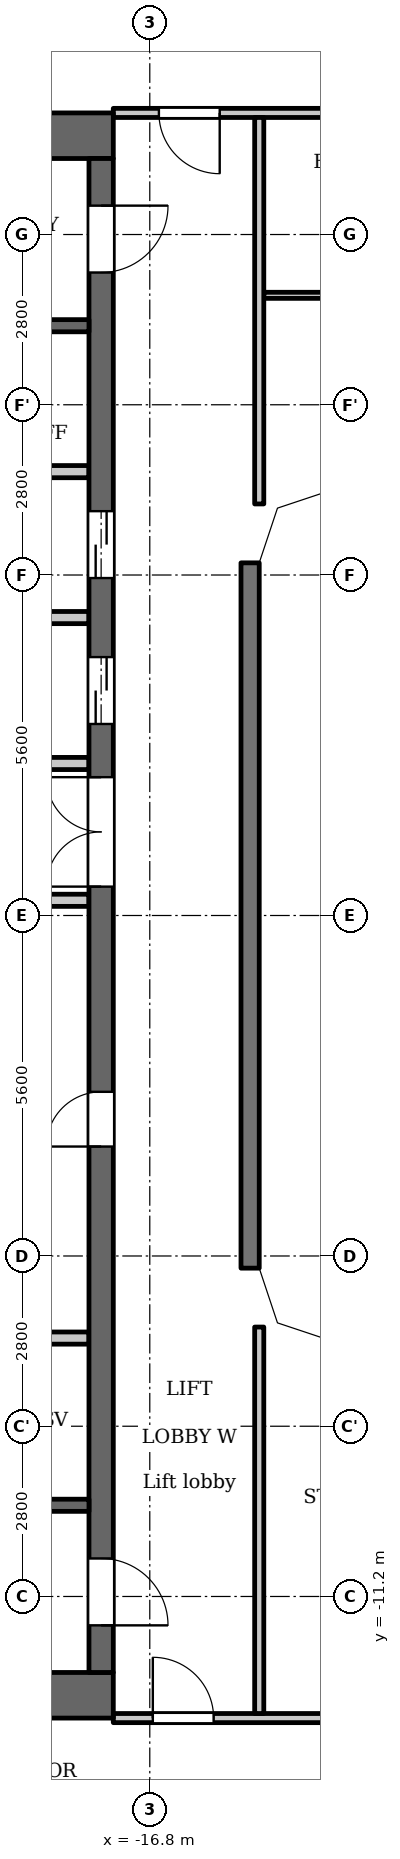
"""IFC4 building model, lengths in metres.
Left out: names, types, materials, properties, quantities, classifications, styles, units other than length and angle.
Written with IfcOpenShell. Run it as: python <this file> out.ifc"""

import sys

from ifc_helpers import new_model, si_unit, direction, frame, frame_2d, origin, place, context, subcontext, project, spatial, polyline, rectangle, outline, extrude, element, fill, save


model = new_model("IFC4")
c1 = context("Model", 3, precision=1e-05, world=origin(), true_north=direction((0.0, 1.0)))
c2 = subcontext(c1, "Body", "Model", "MODEL_VIEW")
j1 = project(units=[si_unit("LENGTHUNIT", "METRE"), si_unit("PLANEANGLEUNIT", "RADIAN")], contexts=[c1])
p1 = place(None, origin())
s1 = spatial("IfcSite", under=j1, at=p1, CompositionType="ELEMENT")
p2 = place(p1, origin())
s2 = spatial("IfcBuilding", under=s1, at=p2, CompositionType="ELEMENT")
p3 = place(p2, frame((0.0, 0.0, 213.4)))
s3 = spatial("IfcBuildingStorey", under=s2, at=p3, CompositionType="ELEMENT", Elevation=213.4)
p4 = place(p3, frame((-15.15, -5.8, 0.0), z_axis=(0.0, 0.0, 1.0), x_axis=(0.0, 1.0, 0.0)))
e1 = element("IfcWall", 1, at=p4, inside=s3, PredefinedType="SOLIDWALL", context=c2, shape_type="SweptSolid", body=[
    extrude(rectangle(XDim=11.6, YDim=0.3, at=frame_2d((5.8, 0.0))), origin(), (0.0, 0.0, 1.0), 3.2),
])
for number, where, z_axis, x_axis in (
    (2, (-17.4, 12.825, 0.0), (0.0, 0.0, 1.0), (-1.0, 0.0, 0.0)),
    (3, (-17.4, -12.825, 0.0), (0.0, 0.0, 1.0), (-1.0, 0.0, 0.0)),
):
    element("IfcWall", number, at=place(p3, frame(where, z_axis=z_axis, x_axis=x_axis)), inside=s3, PredefinedType="SHEAR", context=c2, shape_type="SweptSolid", body=[
        extrude(rectangle(XDim=7.6, YDim=0.75, at=frame_2d((3.8, 0.0))), origin(), (0.0, 0.0, 1.0), 3.2),
    ])
p5 = place(p3, frame((-17.6, -12.45, 0.0), z_axis=(0.0, 0.0, 1.0), x_axis=(0.0, 1.0, 0.0)))
e4 = element("IfcWall", 4, at=p5, inside=s3, PredefinedType="SHEAR", context=c2, shape_type="SweptSolid", body=[
    extrude(rectangle(XDim=24.9, YDim=0.4, at=frame_2d((12.45, 0.0))), origin(), (0.0, 0.0, 1.0), 3.2),
])
p6 = place(p5, frame((8.65, 0.0, 0.0)))
e5 = element("IfcOpeningElement", 5, at=p6, cuts=e4, PredefinedType="OPENING", context=c2, shape_type="SweptSolid", body=[
    extrude(rectangle(XDim=0.9, YDim=2.1, at=frame_2d((0.45, 1.05))), frame((0.0, 0.21, 0.0), z_axis=(0.0, -1.0, 0.0), x_axis=(1.0, 0.0, 0.0)), (0.0, 0.0, 1.0), 0.42),
])
p7 = place(p5, frame((15.6, 0.0, 0.0)))
e6 = element("IfcOpeningElement", 6, at=p7, cuts=e4, PredefinedType="OPENING", context=c2, shape_type="SweptSolid", body=[
    extrude(rectangle(XDim=1.1, YDim=2.1, at=frame_2d((0.55, 1.05))), frame((0.0, 0.21, 0.0), z_axis=(0.0, -1.0, 0.0), x_axis=(1.0, 0.0, 0.0)), (0.0, 0.0, 1.0), 0.42),
])
p8 = place(p5, frame((18.0, 0.0, 0.0)))
e7 = element("IfcOpeningElement", 7, at=p8, cuts=e4, PredefinedType="OPENING", context=c2, shape_type="SweptSolid", body=[
    extrude(rectangle(XDim=1.1, YDim=2.1, at=frame_2d((0.55, 1.05))), frame((0.0, 0.21, 0.0), z_axis=(0.0, -1.0, 0.0), x_axis=(1.0, 0.0, 0.0)), (0.0, 0.0, 1.0), 0.42),
])
p9 = place(p5, frame((23.025, 0.0, 0.0)))
e8 = element("IfcOpeningElement", 8, at=p9, cuts=e4, PredefinedType="OPENING", context=c2, shape_type="SweptSolid", body=[
    extrude(rectangle(XDim=1.1, YDim=2.1, at=frame_2d((0.55, 1.05))), frame((0.0, 0.21, 0.0), z_axis=(0.0, -1.0, 0.0), x_axis=(1.0, 0.0, 0.0)), (0.0, 0.0, 1.0), 0.42),
])
p10 = place(p5, frame((0.775, 0.0, 0.0)))
e9 = element("IfcOpeningElement", 9, at=p10, cuts=e4, PredefinedType="OPENING", context=c2, shape_type="SweptSolid", body=[
    extrude(rectangle(XDim=1.1, YDim=2.1, at=frame_2d((0.55, 1.05))), frame((0.0, 0.21, 0.0), z_axis=(0.0, -1.0, 0.0), x_axis=(1.0, 0.0, 0.0)), (0.0, 0.0, 1.0), 0.42),
])
p11 = place(p5, frame((12.925, 0.0, 0.0)))
e10 = element("IfcOpeningElement", 10, at=p11, cuts=e4, PredefinedType="OPENING", context=c2, shape_type="SweptSolid", body=[
    extrude(rectangle(XDim=1.8, YDim=2.1, at=frame_2d((0.9, 1.05))), frame((0.0, 0.21, 0.0), z_axis=(0.0, -1.0, 0.0), x_axis=(1.0, 0.0, 0.0)), (0.0, 0.0, 1.0), 0.42),
])
p12 = place(p3, frame((-17.8, -9.7, 0.0), z_axis=(0.0, 0.0, 1.0), x_axis=(-1.0, 0.0, 0.0)))
e11 = element("IfcWall", 11, at=p12, inside=s3, PredefinedType="SHEAR", context=c2, shape_type="SweptSolid", body=[
    extrude(rectangle(XDim=5.65, YDim=0.2, at=frame_2d((2.825, 0.0))), origin(), (0.0, 0.0, 1.0), 3.2),
])
p13 = place(p12, frame((0.85, 0.0, 0.0)))
e12 = element("IfcOpeningElement", 12, at=p13, cuts=e11, PredefinedType="OPENING", context=c2, shape_type="SweptSolid", body=[
    extrude(rectangle(XDim=1.1, YDim=2.1, at=frame_2d((0.55, 1.05))), frame((0.0, 0.11, 0.0), z_axis=(0.0, -1.0, 0.0), x_axis=(1.0, 0.0, 0.0)), (0.0, 0.0, 1.0), 0.22),
])
p14 = place(p12, frame((3.75, 0.0, 0.0)))
e13 = element("IfcOpeningElement", 13, at=p14, cuts=e11, PredefinedType="OPENING", context=c2, shape_type="SweptSolid", body=[
    extrude(rectangle(XDim=1.1, YDim=2.1, at=frame_2d((0.55, 1.05))), frame((0.0, 0.11, 0.0), z_axis=(0.0, -1.0, 0.0), x_axis=(1.0, 0.0, 0.0)), (0.0, 0.0, 1.0), 0.22),
])
p15 = place(p3, frame((-17.8, -6.95, 0.0), z_axis=(0.0, 0.0, 1.0), x_axis=(-1.0, 0.0, 0.0)))
e14 = element("IfcWall", 14, at=p15, inside=s3, PredefinedType="PARTITIONING", context=c2, shape_type="SweptSolid", body=[
    extrude(rectangle(XDim=2.8, YDim=0.2, at=frame_2d((1.4, 0.0))), origin(), (0.0, 0.0, 1.0), 3.2),
])
p16 = place(p3, frame((-17.8, 0.25, 0.0), z_axis=(0.0, 0.0, 1.0), x_axis=(-1.0, 0.0, 0.0)))
e15 = element("IfcWall", 15, at=p16, inside=s3, PredefinedType="PARTITIONING", context=c2, shape_type="SweptSolid", body=[
    extrude(rectangle(XDim=3.0, YDim=0.2, at=frame_2d((1.5, 0.0))), origin(), (0.0, 0.0, 1.0), 3.2),
])
p17 = place(p16, frame((1.98, 0.0, 0.0)))
e16 = element("IfcOpeningElement", 16, at=p17, cuts=e15, PredefinedType="OPENING", context=c2, shape_type="SweptSolid", body=[
    extrude(rectangle(XDim=0.9, YDim=2.1, at=frame_2d((0.45, 1.05))), frame((0.0, 0.11, 0.0), z_axis=(0.0, -1.0, 0.0), x_axis=(1.0, 0.0, 0.0)), (0.0, 0.0, 1.0), 0.22),
])
p18 = place(p3, frame((-17.8, 2.5, 0.0), z_axis=(0.0, 0.0, 1.0), x_axis=(-1.0, 0.0, 0.0)))
e17 = element("IfcWall", 17, at=p18, inside=s3, PredefinedType="PARTITIONING", context=c2, shape_type="SweptSolid", body=[
    extrude(rectangle(XDim=3.0, YDim=0.2, at=frame_2d((1.5, 0.0))), origin(), (0.0, 0.0, 1.0), 3.2),
])
for number, where, z_axis, x_axis in (
    (18, (-17.8, 4.9, 0.0), (0.0, 0.0, 1.0), (-1.0, 0.0, 0.0)),
    (19, (-17.8, 7.3, 0.0), (0.0, 0.0, 1.0), (-1.0, 0.0, 0.0)),
):
    element("IfcWall", number, at=place(p3, frame(where, z_axis=z_axis, x_axis=x_axis)), inside=s3, PredefinedType="PARTITIONING", context=c2, shape_type="SweptSolid", body=[
        extrude(rectangle(XDim=2.8, YDim=0.2, at=frame_2d((1.4, 0.0))), origin(), (0.0, 0.0, 1.0), 3.2),
    ])
p19 = place(p3, frame((-17.8, 9.7, 0.0), z_axis=(0.0, 0.0, 1.0), x_axis=(-1.0, 0.0, 0.0)))
e20 = element("IfcWall", 20, at=p19, inside=s3, PredefinedType="SHEAR", context=c2, shape_type="SweptSolid", body=[
    extrude(rectangle(XDim=5.65, YDim=0.2, at=frame_2d((2.825, 0.0))), origin(), (0.0, 0.0, 1.0), 3.2),
])
p20 = place(p19, frame((0.85, 0.0, 0.0)))
e21 = element("IfcOpeningElement", 21, at=p20, cuts=e20, PredefinedType="OPENING", context=c2, shape_type="SweptSolid", body=[
    extrude(rectangle(XDim=1.1, YDim=2.1, at=frame_2d((0.55, 1.05))), frame((0.0, 0.11, 0.0), z_axis=(0.0, -1.0, 0.0), x_axis=(1.0, 0.0, 0.0)), (0.0, 0.0, 1.0), 0.22),
])
p21 = place(p19, frame((3.75, 0.0, 0.0)))
e22 = element("IfcOpeningElement", 22, at=p21, cuts=e20, PredefinedType="OPENING", context=c2, shape_type="SweptSolid", body=[
    extrude(rectangle(XDim=1.1, YDim=2.1, at=frame_2d((0.55, 1.05))), frame((0.0, 0.11, 0.0), z_axis=(0.0, -1.0, 0.0), x_axis=(1.0, 0.0, 0.0)), (0.0, 0.0, 1.0), 0.22),
])
p22 = place(p3, frame((-17.4, -13.2, 0.0), z_axis=(0.0, 0.0, 1.0), x_axis=(1.0, 0.0, 0.0)))
e23 = element("IfcWall", 23, at=p22, inside=s3, PredefinedType="PARTITIONING", context=c2, shape_type="SweptSolid", body=[
    extrude(rectangle(XDim=34.8, YDim=0.15, at=frame_2d((17.4, 0.0))), origin(), (0.0, 0.0, 1.0), 3.2),
])
p23 = place(p22, frame((0.65, 0.0, 0.0)))
e24 = element("IfcOpeningElement", 24, at=p23, cuts=e23, PredefinedType="OPENING", context=c2, shape_type="SweptSolid", body=[
    extrude(rectangle(XDim=1.0, YDim=2.1, at=frame_2d((0.5, 1.05))), frame((0.0, 0.085, 0.0), z_axis=(0.0, -1.0, 0.0), x_axis=(1.0, 0.0, 0.0)), (0.0, 0.0, 1.0), 0.17),
])
p24 = place(p22, frame((33.05, 0.0, 0.0)))
e25 = element("IfcOpeningElement", 25, at=p24, cuts=e23, PredefinedType="OPENING", context=c2, shape_type="SweptSolid", body=[
    extrude(rectangle(XDim=1.0, YDim=2.1, at=frame_2d((0.5, 1.05))), frame((0.0, 0.085, 0.0), z_axis=(0.0, -1.0, 0.0), x_axis=(1.0, 0.0, 0.0)), (0.0, 0.0, 1.0), 0.17),
])
p25 = place(p22, frame((4.55, 0.0, 0.0)))
e26 = element("IfcOpeningElement", 26, at=p25, cuts=e23, PredefinedType="OPENING", context=c2, shape_type="SweptSolid", body=[
    extrude(rectangle(XDim=1.0, YDim=2.1, at=frame_2d((0.5, 1.05))), frame((0.0, 0.085, 0.0), z_axis=(0.0, -1.0, 0.0), x_axis=(1.0, 0.0, 0.0)), (0.0, 0.0, 1.0), 0.17),
])
p26 = place(p22, frame((6.9, 0.0, 0.0)))
e27 = element("IfcOpeningElement", 27, at=p26, cuts=e23, PredefinedType="OPENING", context=c2, shape_type="SweptSolid", body=[
    extrude(rectangle(XDim=1.0, YDim=2.1, at=frame_2d((0.5, 1.05))), frame((0.0, 0.085, 0.0), z_axis=(0.0, -1.0, 0.0), x_axis=(1.0, 0.0, 0.0)), (0.0, 0.0, 1.0), 0.17),
])
p27 = place(p22, frame((15.75, 0.0, 0.0)))
e28 = element("IfcOpeningElement", 28, at=p27, cuts=e23, PredefinedType="OPENING", context=c2, shape_type="SweptSolid", body=[
    extrude(rectangle(XDim=1.0, YDim=2.1, at=frame_2d((0.5, 1.05))), frame((0.0, 0.085, 0.0), z_axis=(0.0, -1.0, 0.0), x_axis=(1.0, 0.0, 0.0)), (0.0, 0.0, 1.0), 0.17),
])
p28 = place(p22, frame((18.1, 0.0, 0.0)))
e29 = element("IfcOpeningElement", 29, at=p28, cuts=e23, PredefinedType="OPENING", context=c2, shape_type="SweptSolid", body=[
    extrude(rectangle(XDim=1.0, YDim=2.1, at=frame_2d((0.5, 1.05))), frame((0.0, 0.085, 0.0), z_axis=(0.0, -1.0, 0.0), x_axis=(1.0, 0.0, 0.0)), (0.0, 0.0, 1.0), 0.17),
])
p29 = place(p22, frame((26.95, 0.0, 0.0)))
e30 = element("IfcOpeningElement", 30, at=p29, cuts=e23, PredefinedType="OPENING", context=c2, shape_type="SweptSolid", body=[
    extrude(rectangle(XDim=1.0, YDim=2.1, at=frame_2d((0.5, 1.05))), frame((0.0, 0.085, 0.0), z_axis=(0.0, -1.0, 0.0), x_axis=(1.0, 0.0, 0.0)), (0.0, 0.0, 1.0), 0.17),
])
p30 = place(p22, frame((29.25, 0.0, 0.0)))
e31 = element("IfcOpeningElement", 31, at=p30, cuts=e23, PredefinedType="OPENING", context=c2, shape_type="SweptSolid", body=[
    extrude(rectangle(XDim=1.0, YDim=2.1, at=frame_2d((0.5, 1.05))), frame((0.0, 0.085, 0.0), z_axis=(0.0, -1.0, 0.0), x_axis=(1.0, 0.0, 0.0)), (0.0, 0.0, 1.0), 0.17),
])
p31 = place(p3, frame((-14.925, 10.2, 0.0), z_axis=(0.0, 0.0, 1.0), x_axis=(1.0, 0.0, 0.0)))
e32 = element("IfcWall", 32, at=p31, inside=s3, PredefinedType="PARTITIONING", context=c2, shape_type="SweptSolid", body=[
    extrude(rectangle(XDim=29.85, YDim=0.1, at=frame_2d((14.925, 0.0))), origin(), (0.0, 0.0, 1.0), 3.2),
])
p32 = place(p31, frame((13.475, 0.0, 0.0)))
e33 = element("IfcOpeningElement", 33, at=p32, cuts=e32, PredefinedType="OPENING", context=c2, shape_type="SweptSolid", body=[
    extrude(rectangle(XDim=0.9, YDim=2.1, at=frame_2d((0.45, 1.05))), frame((0.0, 0.06, 0.0), z_axis=(0.0, -1.0, 0.0), x_axis=(1.0, 0.0, 0.0)), (0.0, 0.0, 1.0), 0.12),
])
p33 = place(p31, frame((4.375, 0.0, 0.0)))
e34 = element("IfcOpeningElement", 34, at=p33, cuts=e32, PredefinedType="OPENING", context=c2, shape_type="SweptSolid", body=[
    extrude(rectangle(XDim=0.9, YDim=2.1, at=frame_2d((0.45, 1.05))), frame((0.0, 0.06, 0.0), z_axis=(0.0, -1.0, 0.0), x_axis=(1.0, 0.0, 0.0)), (0.0, 0.0, 1.0), 0.12),
])
p34 = place(p31, frame((19.075, 0.0, 0.0)))
e35 = element("IfcOpeningElement", 35, at=p34, cuts=e32, PredefinedType="OPENING", context=c2, shape_type="SweptSolid", body=[
    extrude(rectangle(XDim=0.9, YDim=2.1, at=frame_2d((0.45, 1.05))), frame((0.0, 0.06, 0.0), z_axis=(0.0, -1.0, 0.0), x_axis=(1.0, 0.0, 0.0)), (0.0, 0.0, 1.0), 0.12),
])
p35 = place(p31, frame((21.175, 0.0, 0.0)))
e36 = element("IfcOpeningElement", 36, at=p35, cuts=e32, PredefinedType="OPENING", context=c2, shape_type="SweptSolid", body=[
    extrude(rectangle(XDim=0.9, YDim=2.1, at=frame_2d((0.45, 1.05))), frame((0.0, 0.06, 0.0), z_axis=(0.0, -1.0, 0.0), x_axis=(1.0, 0.0, 0.0)), (0.0, 0.0, 1.0), 0.12),
])
p36 = place(p3, frame((-17.4, 13.2, 0.0), z_axis=(0.0, 0.0, 1.0), x_axis=(1.0, 0.0, 0.0)))
e37 = element("IfcWall", 37, at=p36, inside=s3, PredefinedType="PARTITIONING", context=c2, shape_type="SweptSolid", body=[
    extrude(rectangle(XDim=34.8, YDim=0.15, at=frame_2d((17.4, 0.0))), origin(), (0.0, 0.0, 1.0), 3.2),
])
p37 = place(p36, frame((0.75, 0.0, 0.0)))
e38 = element("IfcOpeningElement", 38, at=p37, cuts=e37, PredefinedType="OPENING", context=c2, shape_type="SweptSolid", body=[
    extrude(rectangle(XDim=1.0, YDim=2.1, at=frame_2d((0.5, 1.05))), frame((0.0, 0.085, 0.0), z_axis=(0.0, -1.0, 0.0), x_axis=(1.0, 0.0, 0.0)), (0.0, 0.0, 1.0), 0.17),
])
p38 = place(p36, frame((33.15, 0.0, 0.0)))
e39 = element("IfcOpeningElement", 39, at=p38, cuts=e37, PredefinedType="OPENING", context=c2, shape_type="SweptSolid", body=[
    extrude(rectangle(XDim=1.0, YDim=2.1, at=frame_2d((0.5, 1.05))), frame((0.0, 0.085, 0.0), z_axis=(0.0, -1.0, 0.0), x_axis=(1.0, 0.0, 0.0)), (0.0, 0.0, 1.0), 0.17),
])
p39 = place(p36, frame((12.45, 0.0, 0.0)))
e40 = element("IfcOpeningElement", 40, at=p39, cuts=e37, PredefinedType="OPENING", context=c2, shape_type="SweptSolid", body=[
    extrude(rectangle(XDim=1.0, YDim=2.1, at=frame_2d((0.5, 1.05))), frame((0.0, 0.085, 0.0), z_axis=(0.0, -1.0, 0.0), x_axis=(1.0, 0.0, 0.0)), (0.0, 0.0, 1.0), 0.17),
])
p40 = place(p36, frame((18.05, 0.0, 0.0)))
e41 = element("IfcOpeningElement", 41, at=p40, cuts=e37, PredefinedType="OPENING", context=c2, shape_type="SweptSolid", body=[
    extrude(rectangle(XDim=1.0, YDim=2.1, at=frame_2d((0.5, 1.05))), frame((0.0, 0.085, 0.0), z_axis=(0.0, -1.0, 0.0), x_axis=(1.0, 0.0, 0.0)), (0.0, 0.0, 1.0), 0.17),
])
for number, where, z_axis, x_axis in (
    (42, (-15.0, -13.125, 0.0), (0.0, 0.0, 1.0), (0.0, 1.0, 0.0)),
    (43, (-15.0, 6.769, 0.0), (0.0, 0.0, 1.0), (0.0, 1.0, 0.0)),
):
    element("IfcWall", number, at=place(p3, frame(where, z_axis=z_axis, x_axis=x_axis)), inside=s3, PredefinedType="PARTITIONING", context=c2, shape_type="SweptSolid", body=[
        extrude(rectangle(XDim=6.356, YDim=0.15, at=frame_2d((3.178, 0.0))), origin(), (0.0, 0.0, 1.0), 3.2),
    ])
p41 = place(p3, origin())
e44 = element("IfcWall", 44, at=p41, inside=s3, PredefinedType="SOLIDWALL", context=c2, shape_type="SweptSolid", body=[
    extrude(outline(polyline([(-13.849, 7.3), (-14.937, 6.937), (-15.3, 5.849), (-15.3, 5.8), (-15.0, 5.8), (-14.7, 6.7), (-13.8, 7.0), (-13.8, 7.3), (-13.849, 7.3)])), origin(), (0.0, 0.0, 1.0), 3.2),
])
e45 = element("IfcWall", 45, at=p41, inside=s3, PredefinedType="SOLIDWALL", context=c2, shape_type="SweptSolid", body=[
    extrude(outline(polyline([(-14.937, -6.937), (-13.849, -7.3), (-13.8, -7.3), (-13.8, -7.0), (-14.7, -6.7), (-15.0, -5.8), (-15.3, -5.8), (-15.3, -5.849), (-14.937, -6.937)])), origin(), (0.0, 0.0, 1.0), 3.2),
])
p42 = place(p6, origin())
e46 = element("IfcDoor", 46, at=p42, inside=s3, OperationType="SINGLE_SWING_RIGHT", PredefinedType="DOOR", context=c2, shape_type="SweptSolid", body=[
    extrude(rectangle(XDim=0.9, YDim=2.1, at=frame_2d((0.45, 1.05))), frame((0.0, 0.025, 0.0), z_axis=(0.0, -1.0, 0.0), x_axis=(1.0, 0.0, 0.0)), (0.0, 0.0, 1.0), 0.05),
])
fill(e5, e46)
p43 = place(p7, origin())
e47 = element("IfcDoor", 47, at=p43, inside=s3, OperationType="DOUBLE_DOOR_SLIDING", PredefinedType="DOOR", context=c2, shape_type="SweptSolid", body=[
    extrude(rectangle(XDim=1.1, YDim=2.1, at=frame_2d((0.55, 1.05))), frame((0.0, 0.025, 0.0), z_axis=(0.0, -1.0, 0.0), x_axis=(1.0, 0.0, 0.0)), (0.0, 0.0, 1.0), 0.05),
])
fill(e6, e47)
p44 = place(p8, origin())
e48 = element("IfcDoor", 48, at=p44, inside=s3, OperationType="DOUBLE_DOOR_SLIDING", PredefinedType="DOOR", context=c2, shape_type="SweptSolid", body=[
    extrude(rectangle(XDim=1.1, YDim=2.1, at=frame_2d((0.55, 1.05))), frame((0.0, 0.025, 0.0), z_axis=(0.0, -1.0, 0.0), x_axis=(1.0, 0.0, 0.0)), (0.0, 0.0, 1.0), 0.05),
])
fill(e7, e48)
p45 = place(p9, origin())
e49 = element("IfcDoor", 49, at=p45, inside=s3, OperationType="SINGLE_SWING_RIGHT", PredefinedType="DOOR", context=c2, shape_type="SweptSolid", body=[
    extrude(rectangle(XDim=1.1, YDim=2.1, at=frame_2d((0.55, 1.05))), frame((0.0, 0.025, 0.0), z_axis=(0.0, -1.0, 0.0), x_axis=(1.0, 0.0, 0.0)), (0.0, 0.0, 1.0), 0.05),
])
fill(e8, e49)
p46 = place(p10, origin())
e50 = element("IfcDoor", 50, at=p46, inside=s3, OperationType="SINGLE_SWING_LEFT", PredefinedType="DOOR", context=c2, shape_type="SweptSolid", body=[
    extrude(rectangle(XDim=1.1, YDim=2.1, at=frame_2d((0.55, 1.05))), frame((0.0, 0.025, 0.0), z_axis=(0.0, -1.0, 0.0), x_axis=(1.0, 0.0, 0.0)), (0.0, 0.0, 1.0), 0.05),
])
fill(e9, e50)
p47 = place(p11, origin())
e51 = element("IfcDoor", 51, at=p47, inside=s3, OperationType="DOUBLE_DOOR_SINGLE_SWING", PredefinedType="DOOR", context=c2, shape_type="SweptSolid", body=[
    extrude(rectangle(XDim=1.8, YDim=2.1, at=frame_2d((0.9, 1.05))), frame((0.0, 0.025, 0.0), z_axis=(0.0, -1.0, 0.0), x_axis=(1.0, 0.0, 0.0)), (0.0, 0.0, 1.0), 0.05),
])
fill(e10, e51)
p48 = place(p37, origin())
e52 = element("IfcDoor", 52, at=p48, inside=s3, OperationType="SINGLE_SWING_RIGHT", PredefinedType="DOOR", context=c2, shape_type="SweptSolid", body=[
    extrude(rectangle(XDim=1.0, YDim=2.1, at=frame_2d((0.5, 1.05))), frame((0.0, 0.025, 0.0), z_axis=(0.0, -1.0, 0.0), x_axis=(1.0, 0.0, 0.0)), (0.0, 0.0, 1.0), 0.05),
])
fill(e38, e52)
p49 = place(p23, origin())
e53 = element("IfcDoor", 53, at=p49, inside=s3, OperationType="SINGLE_SWING_RIGHT", PredefinedType="DOOR", context=c2, shape_type="SweptSolid", body=[
    extrude(rectangle(XDim=1.0, YDim=2.1, at=frame_2d((0.5, 1.05))), frame((0.0, 0.025, 0.0), z_axis=(0.0, -1.0, 0.0), x_axis=(1.0, 0.0, 0.0)), (0.0, 0.0, 1.0), 0.05),
])
fill(e24, e53)
save(model, sys.argv[1])
